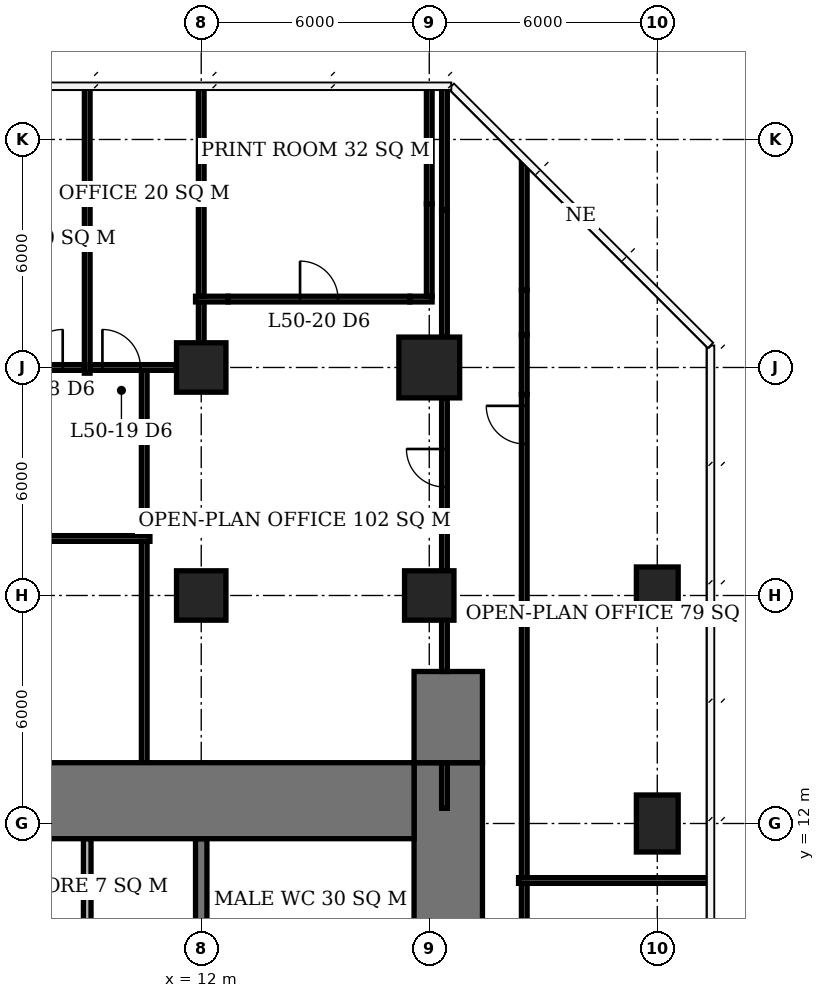
"""IFC4 building model, lengths in metres.
Left out: names, types, materials, properties, quantities, classifications, styles, units other than length and angle.
Written with IfcOpenShell. Run it as: python <this file> out.ifc"""

import sys

from ifc_helpers import new_model, si_unit, direction, frame, frame_2d, origin, origin_2d, place, context, subcontext, project, spatial, rectangle, extrude, element, fill, save


model = new_model("IFC4")
c1 = context("Model", 3, precision=1e-05, world=origin(), true_north=direction((0.0, 1.0)))
c2 = subcontext(c1, "Body", "Model", "MODEL_VIEW")
j1 = project(units=[si_unit("LENGTHUNIT", "METRE"), si_unit("PLANEANGLEUNIT", "RADIAN")], contexts=[c1])
p1 = place(None, origin())
s1 = spatial("IfcSite", under=j1, at=p1, CompositionType="ELEMENT")
p2 = place(p1, origin())
s2 = spatial("IfcBuilding", under=s1, at=p2, CompositionType="ELEMENT")
p3 = place(p2, frame((0.0, 0.0, 204.5)))
s3 = spatial("IfcBuildingStorey", under=s2, at=p3, CompositionType="ELEMENT", Elevation=204.5)
for number, where, z_axis, x_axis in (
    (1, (12.0, 18.0, 0.0), (0.0, 0.0, 1.0), (1.0, 0.0, 0.0)),
    (2, (12.0, 24.0, 0.0), (0.0, 0.0, 1.0), (1.0, 0.0, 0.0)),
    (3, (18.0, 18.0, 0.0), (0.0, 0.0, 1.0), (1.0, 0.0, 0.0)),
):
    element("IfcColumn", number, at=place(p3, frame(where, z_axis=z_axis, x_axis=x_axis)), inside=s3, PredefinedType="COLUMN", context=c2, shape_type="SweptSolid", body=[
        extrude(rectangle(XDim=1.3, YDim=1.3, at=origin_2d()), origin(), (0.0, 0.0, 1.0), 3.9),
    ])
p4 = place(p3, frame((18.0, 24.0, 0.0), z_axis=(0.0, 0.0, 1.0), x_axis=(1.0, 0.0, 0.0)))
e4 = element("IfcColumn", 4, at=p4, inside=s3, PredefinedType="COLUMN", context=c2, shape_type="SweptSolid", body=[
    extrude(rectangle(XDim=1.6, YDim=1.6, at=origin_2d()), origin(), (0.0, 0.0, 1.0), 3.9),
])
for number, where, z_axis, x_axis in (
    (5, (24.0, 12.0, 0.0), (0.0, 0.0, 1.0), (0.0, 1.0, 0.0)),
    (6, (24.0, 18.0, 0.0), (0.0, 0.0, 1.0), (0.0, 1.0, 0.0)),
):
    element("IfcColumn", number, at=place(p3, frame(where, z_axis=z_axis, x_axis=x_axis)), inside=s3, PredefinedType="COLUMN", context=c2, shape_type="SweptSolid", body=[
        extrude(rectangle(XDim=1.5, YDim=1.1, at=origin_2d()), origin(), (0.0, 0.0, 1.0), 3.9),
    ])
p5 = place(p3, frame((-5.6, 12.6, 0.0), z_axis=(0.0, 0.0, 1.0), x_axis=(1.0, 0.0, 0.0)))
e7 = element("IfcWall", 7, at=p5, inside=s3, PredefinedType="SHEAR", context=c2, shape_type="SweptSolid", body=[
    extrude(rectangle(XDim=23.2, YDim=2.0, at=frame_2d((11.6, 0.0))), origin(), (0.0, 0.0, 1.0), 3.9),
])
p6 = place(p3, frame((18.5, -7.6, 0.0), z_axis=(0.0, 0.0, 1.0), x_axis=(0.0, 1.0, 0.0)))
e8 = element("IfcWall", 8, at=p6, inside=s3, PredefinedType="SHEAR", context=c2, shape_type="SweptSolid", body=[
    extrude(rectangle(XDim=21.2, YDim=1.8, at=frame_2d((10.6, 0.0))), origin(), (0.0, 0.0, 1.0), 3.9),
])
p7 = place(p6, frame((9.2, 0.0, 0.0)))
e9 = element("IfcOpeningElement", 9, at=p7, cuts=e8, PredefinedType="OPENING", context=c2, shape_type="SweptSolid", body=[
    extrude(rectangle(XDim=1.8, YDim=2.4, at=frame_2d((0.9, 1.2))), frame((0.0, 0.91, 0.0), z_axis=(0.0, -1.0, 0.0), x_axis=(1.0, 0.0, 0.0)), (0.0, 0.0, 1.0), 1.82),
])
p8 = place(p3, frame((18.5, 13.6, 0.0), z_axis=(0.0, 0.0, 1.0), x_axis=(0.0, 1.0, 0.0)))
e10 = element("IfcWall", 10, at=p8, inside=s3, PredefinedType="SHEAR", context=c2, shape_type="SweptSolid", body=[
    extrude(rectangle(XDim=2.4, YDim=1.8, at=frame_2d((1.2, 0.0))), origin(), (0.0, 0.0, 1.0), 3.9),
])
p9 = place(p3, frame((12.0, 6.15, 0.0), z_axis=(0.0, 0.0, 1.0), x_axis=(0.0, 1.0, 0.0)))
e11 = element("IfcWall", 11, at=p9, inside=s3, PredefinedType="SHEAR", context=c2, shape_type="SweptSolid", body=[
    extrude(rectangle(XDim=5.45, YDim=0.3, at=frame_2d((2.725, 0.0))), origin(), (0.0, 0.0, 1.0), 3.9),
])
p10 = place(p3, frame((9.0, 6.15, 0.0), z_axis=(0.0, 0.0, 1.0), x_axis=(0.0, 1.0, 0.0)))
e12 = element("IfcWall", 12, at=p10, inside=s3, PredefinedType="SOLIDWALL", context=c2, shape_type="SweptSolid", body=[
    extrude(rectangle(XDim=5.45, YDim=0.2, at=frame_2d((2.725, 0.0))), origin(), (0.0, 0.0, 1.0), 3.9),
])
p11 = place(p3, frame((6.66, 24.0, 0.0), z_axis=(0.0, 0.0, 1.0), x_axis=(1.0, 0.0, 0.0)))
e13 = element("IfcWall", 13, at=p11, inside=s3, PredefinedType="PARTITIONING", context=c2, shape_type="SweptSolid", body=[
    extrude(rectangle(XDim=2.265, YDim=0.15, at=frame_2d((1.133, 0.0))), origin(), (0.0, 0.0, 1.0), 3.65),
])
p12 = place(p11, frame((0.695, 0.0, 0.0)))
e14 = element("IfcOpeningElement", 14, at=p12, cuts=e13, PredefinedType="OPENING", context=c2, shape_type="SweptSolid", body=[
    extrude(rectangle(XDim=1.0, YDim=2.1, at=frame_2d((0.5, 1.05))), frame((0.0, 0.085, 0.0), z_axis=(0.0, -1.0, 0.0), x_axis=(1.0, 0.0, 0.0)), (0.0, 0.0, 1.0), 0.17),
])
p13 = place(p3, frame((9.075, 24.0, 0.0), z_axis=(0.0, 0.0, 1.0), x_axis=(1.0, 0.0, 0.0)))
e15 = element("IfcWall", 15, at=p13, inside=s3, PredefinedType="PARTITIONING", context=c2, shape_type="SweptSolid", body=[
    extrude(rectangle(XDim=2.265, YDim=0.15, at=frame_2d((1.133, 0.0))), origin(), (0.0, 0.0, 1.0), 3.65),
])
p14 = place(p13, frame((0.325, 0.0, 0.0)))
e16 = element("IfcOpeningElement", 16, at=p14, cuts=e15, PredefinedType="OPENING", context=c2, shape_type="SweptSolid", body=[
    extrude(rectangle(XDim=1.0, YDim=2.1, at=frame_2d((0.5, 1.05))), frame((0.0, 0.085, 0.0), z_axis=(0.0, -1.0, 0.0), x_axis=(1.0, 0.0, 0.0)), (0.0, 0.0, 1.0), 0.17),
])
p15 = place(p3, frame((11.85, 25.8, 0.0), z_axis=(0.0, 0.0, 1.0), x_axis=(1.0, 0.0, 0.0)))
e17 = element("IfcWall", 17, at=p15, inside=s3, PredefinedType="PARTITIONING", context=c2, shape_type="SweptSolid", body=[
    extrude(rectangle(XDim=0.86, YDim=0.15, at=frame_2d((0.43, 0.0))), origin(), (0.0, 0.0, 1.0), 2.65),
])
p16 = place(p3, frame((12.71, 25.8, 0.0), z_axis=(0.0, 0.0, 1.0), x_axis=(1.0, 0.0, 0.0)))
e18 = element("IfcWall", 18, at=p16, inside=s3, PredefinedType="PARTITIONING", context=c2, shape_type="SweptSolid", body=[
    extrude(rectangle(XDim=4.78, YDim=0.15, at=frame_2d((2.39, 0.0))), origin(), (0.0, 0.0, 1.0), 3.65),
])
p17 = place(p16, frame((1.89, 0.0, 0.0)))
e19 = element("IfcOpeningElement", 19, at=p17, cuts=e18, PredefinedType="OPENING", context=c2, shape_type="SweptSolid", body=[
    extrude(rectangle(XDim=1.0, YDim=2.1, at=frame_2d((0.5, 1.05))), frame((0.0, 0.085, 0.0), z_axis=(0.0, -1.0, 0.0), x_axis=(1.0, 0.0, 0.0)), (0.0, 0.0, 1.0), 0.17),
])
p18 = place(p3, frame((17.49, 25.8, 0.0), z_axis=(0.0, 0.0, 1.0), x_axis=(1.0, 0.0, 0.0)))
e20 = element("IfcWall", 20, at=p18, inside=s3, PredefinedType="PARTITIONING", context=c2, shape_type="SweptSolid", body=[
    extrude(rectangle(XDim=0.585, YDim=0.15, at=frame_2d((0.292, 0.0))), origin(), (0.0, 0.0, 1.0), 2.65),
])
p19 = place(p3, frame((9.0, 23.85, 0.0), z_axis=(0.0, 0.0, 1.0), x_axis=(0.0, 1.0, 0.0)))
e21 = element("IfcWall", 21, at=p19, inside=s3, PredefinedType="PARTITIONING", context=c2, shape_type="SweptSolid", body=[
    extrude(rectangle(XDim=3.74, YDim=0.15, at=frame_2d((1.87, 0.0))), origin(), (0.0, 0.0, 1.0), 3.65),
])
p20 = place(p3, frame((9.0, 27.59, 0.0), z_axis=(0.0, 0.0, 1.0), x_axis=(0.0, 1.0, 0.0)))
e22 = element("IfcWall", 22, at=p20, inside=s3, PredefinedType="PARTITIONING", context=c2, shape_type="SweptSolid", body=[
    extrude(rectangle(XDim=0.72, YDim=0.15, at=frame_2d((0.36, 0.0))), origin(), (0.0, 0.0, 1.0), 2.65),
])
p21 = place(p3, frame((9.0, 28.31, 0.0), z_axis=(0.0, 0.0, 1.0), x_axis=(0.0, 1.0, 0.0)))
e23 = element("IfcWall", 23, at=p21, inside=s3, PredefinedType="PARTITIONING", context=c2, shape_type="SweptSolid", body=[
    extrude(rectangle(XDim=3.09, YDim=0.15, at=frame_2d((1.545, 0.0))), origin(), (0.0, 0.0, 1.0), 3.65),
])
p22 = place(p3, frame((12.0, 24.65, 0.0), z_axis=(0.0, 0.0, 1.0), x_axis=(0.0, 1.0, 0.0)))
e24 = element("IfcWall", 24, at=p22, inside=s3, PredefinedType="PARTITIONING", context=c2, shape_type="SweptSolid", body=[
    extrude(rectangle(XDim=1.075, YDim=0.15, at=frame_2d((0.538, 0.0))), origin(), (0.0, 0.0, 1.0), 2.65),
])
p23 = place(p3, frame((12.0, 25.875, 0.0), z_axis=(0.0, 0.0, 1.0), x_axis=(0.0, 1.0, 0.0)))
e25 = element("IfcWall", 25, at=p23, inside=s3, PredefinedType="PARTITIONING", context=c2, shape_type="SweptSolid", body=[
    extrude(rectangle(XDim=2.435, YDim=0.15, at=frame_2d((1.218, 0.0))), origin(), (0.0, 0.0, 1.0), 2.65),
])
p24 = place(p3, frame((12.0, 28.31, 0.0), z_axis=(0.0, 0.0, 1.0), x_axis=(0.0, 1.0, 0.0)))
e26 = element("IfcWall", 26, at=p24, inside=s3, PredefinedType="PARTITIONING", context=c2, shape_type="SweptSolid", body=[
    extrude(rectangle(XDim=3.09, YDim=0.15, at=frame_2d((1.545, 0.0))), origin(), (0.0, 0.0, 1.0), 3.65),
])
p25 = place(p3, frame((18.0, 25.875, 0.0), z_axis=(0.0, 0.0, 1.0), x_axis=(0.0, 1.0, 0.0)))
e27 = element("IfcWall", 27, at=p25, inside=s3, PredefinedType="PARTITIONING", context=c2, shape_type="SweptSolid", body=[
    extrude(rectangle(XDim=2.435, YDim=0.15, at=frame_2d((1.218, 0.0))), origin(), (0.0, 0.0, 1.0), 2.65),
])
p26 = place(p3, frame((18.0, 28.31, 0.0), z_axis=(0.0, 0.0, 1.0), x_axis=(0.0, 1.0, 0.0)))
e28 = element("IfcWall", 28, at=p26, inside=s3, PredefinedType="PARTITIONING", context=c2, shape_type="SweptSolid", body=[
    extrude(rectangle(XDim=3.09, YDim=0.15, at=frame_2d((1.545, 0.0))), origin(), (0.0, 0.0, 1.0), 3.65),
])
p27 = place(p3, frame((-6.325, 19.5, 0.0), z_axis=(0.0, 0.0, 1.0), x_axis=(1.0, 0.0, 0.0)))
e29 = element("IfcWall", 29, at=p27, inside=s3, PredefinedType="PARTITIONING", context=c2, shape_type="SweptSolid", body=[
    extrude(rectangle(XDim=16.975, YDim=0.15, at=frame_2d((8.487, 0.0))), origin(), (0.0, 0.0, 1.0), 3.65),
])
p28 = place(p3, frame((10.5, 12.4, 0.0), z_axis=(0.0, 0.0, 1.0), x_axis=(0.0, 1.0, 0.0)))
e30 = element("IfcWall", 30, at=p28, inside=s3, PredefinedType="PARTITIONING", context=c2, shape_type="SweptSolid", body=[
    extrude(rectangle(XDim=7.025, YDim=0.15, at=frame_2d((3.513, 0.0))), origin(), (0.0, 0.0, 1.0), 3.65),
])
p29 = place(p3, frame((10.5, 19.575, 0.0), z_axis=(0.0, 0.0, 1.0), x_axis=(0.0, 1.0, 0.0)))
e31 = element("IfcWall", 31, at=p29, inside=s3, PredefinedType="PARTITIONING", context=c2, shape_type="SweptSolid", body=[
    extrude(rectangle(XDim=4.35, YDim=0.15, at=frame_2d((2.175, 0.0))), origin(), (0.0, 0.0, 1.0), 3.65),
])
p30 = place(p3, frame((18.4, 12.4, 0.0), z_axis=(0.0, 0.0, 1.0), x_axis=(0.0, 1.0, 0.0)))
e32 = element("IfcWall", 32, at=p30, inside=s3, PredefinedType="PARTITIONING", context=c2, shape_type="SweptSolid", body=[
    extrude(rectangle(XDim=1.2, YDim=0.15, at=frame_2d((0.6, 0.0))), origin(), (0.0, 0.0, 1.0), 3.65),
])
p31 = place(p3, frame((18.4, 16.0, 0.0), z_axis=(0.0, 0.0, 1.0), x_axis=(0.0, 1.0, 0.0)))
e33 = element("IfcWall", 33, at=p31, inside=s3, PredefinedType="PARTITIONING", context=c2, shape_type="SweptSolid", body=[
    extrude(rectangle(XDim=1.35, YDim=0.15, at=frame_2d((0.675, 0.0))), origin(), (0.0, 0.0, 1.0), 3.65),
])
p32 = place(p3, frame((18.4, 18.65, 0.0), z_axis=(0.0, 0.0, 1.0), x_axis=(0.0, 1.0, 0.0)))
e34 = element("IfcWall", 34, at=p32, inside=s3, PredefinedType="PARTITIONING", context=c2, shape_type="SweptSolid", body=[
    extrude(rectangle(XDim=4.55, YDim=0.15, at=frame_2d((2.275, 0.0))), origin(), (0.0, 0.0, 1.0), 3.65),
])
p33 = place(p32, frame((2.205, 0.0, 0.0)))
e35 = element("IfcOpeningElement", 35, at=p33, cuts=e34, PredefinedType="OPENING", context=c2, shape_type="SweptSolid", body=[
    extrude(rectangle(XDim=1.0, YDim=2.1, at=frame_2d((0.5, 1.05))), frame((0.0, 0.085, 0.0), z_axis=(0.0, -1.0, 0.0), x_axis=(1.0, 0.0, 0.0)), (0.0, 0.0, 1.0), 0.17),
])
p34 = place(p3, frame((18.4, 24.8, 0.0), z_axis=(0.0, 0.0, 1.0), x_axis=(0.0, 1.0, 0.0)))
e36 = element("IfcWall", 36, at=p34, inside=s3, PredefinedType="PARTITIONING", context=c2, shape_type="SweptSolid", body=[
    extrude(rectangle(XDim=3.34, YDim=0.15, at=frame_2d((1.67, 0.0))), origin(), (0.0, 0.0, 1.0), 2.65),
])
p35 = place(p3, frame((18.4, 28.14, 0.0), z_axis=(0.0, 0.0, 1.0), x_axis=(0.0, 1.0, 0.0)))
e37 = element("IfcWall", 37, at=p35, inside=s3, PredefinedType="PARTITIONING", context=c2, shape_type="SweptSolid", body=[
    extrude(rectangle(XDim=3.26, YDim=0.15, at=frame_2d((1.63, 0.0))), origin(), (0.0, 0.0, 1.0), 3.65),
])
p36 = place(p3, frame((20.5, 1.575, 0.0), z_axis=(0.0, 0.0, 1.0), x_axis=(0.0, 1.0, 0.0)))
e38 = element("IfcWall", 38, at=p36, inside=s3, PredefinedType="PARTITIONING", context=c2, shape_type="SweptSolid", body=[
    extrude(rectangle(XDim=8.85, YDim=0.15, at=frame_2d((4.425, 0.0))), origin(), (0.0, 0.0, 1.0), 3.65),
])
p37 = place(p36, frame((5.275, 0.0, 0.0)))
e39 = element("IfcOpeningElement", 39, at=p37, cuts=e38, PredefinedType="OPENING", context=c2, shape_type="SweptSolid", body=[
    extrude(rectangle(XDim=1.0, YDim=2.1, at=frame_2d((0.5, 1.05))), frame((0.0, 0.085, 0.0), z_axis=(0.0, -1.0, 0.0), x_axis=(1.0, 0.0, 0.0)), (0.0, 0.0, 1.0), 0.17),
])
p38 = place(p3, frame((20.5, 10.575, 0.0), z_axis=(0.0, 0.0, 1.0), x_axis=(0.0, 1.0, 0.0)))
e40 = element("IfcWall", 40, at=p38, inside=s3, PredefinedType="PARTITIONING", context=c2, shape_type="SweptSolid", body=[
    extrude(rectangle(XDim=12.715, YDim=0.15, at=frame_2d((6.357, 0.0))), origin(), (0.0, 0.0, 1.0), 3.65),
])
p39 = place(p38, frame((11.415, 0.0, 0.0)))
e41 = element("IfcOpeningElement", 41, at=p39, cuts=e40, PredefinedType="OPENING", context=c2, shape_type="SweptSolid", body=[
    extrude(rectangle(XDim=1.0, YDim=2.1, at=frame_2d((0.5, 1.05))), frame((0.0, 0.085, 0.0), z_axis=(0.0, -1.0, 0.0), x_axis=(1.0, 0.0, 0.0)), (0.0, 0.0, 1.0), 0.17),
])
p40 = place(p3, frame((20.5, 23.29, 0.0), z_axis=(0.0, 0.0, 1.0), x_axis=(0.0, 1.0, 0.0)))
e42 = element("IfcWall", 42, at=p40, inside=s3, PredefinedType="PARTITIONING", context=c2, shape_type="SweptSolid", body=[
    extrude(rectangle(XDim=1.57, YDim=0.15, at=frame_2d((0.785, 0.0))), origin(), (0.0, 0.0, 1.0), 2.65),
])
p41 = place(p3, frame((20.5, 24.86, 0.0), z_axis=(0.0, 0.0, 1.0), x_axis=(0.0, 1.0, 0.0)))
e43 = element("IfcWall", 43, at=p41, inside=s3, PredefinedType="PARTITIONING", context=c2, shape_type="SweptSolid", body=[
    extrude(rectangle(XDim=1.18, YDim=0.15, at=frame_2d((0.59, 0.0))), origin(), (0.0, 0.0, 1.0), 2.65),
])
p42 = place(p3, frame((20.5, 26.04, 0.0), z_axis=(0.0, 0.0, 1.0), x_axis=(0.0, 1.0, 0.0)))
e44 = element("IfcWall", 44, at=p42, inside=s3, PredefinedType="PARTITIONING", context=c2, shape_type="SweptSolid", body=[
    extrude(rectangle(XDim=3.348, YDim=0.15, at=frame_2d((1.674, 0.0))), origin(), (0.0, 0.0, 1.0), 3.65),
])
p43 = place(p3, frame((20.35, 10.5, 0.0), z_axis=(0.0, 0.0, 1.0), x_axis=(1.0, 0.0, 0.0)))
e45 = element("IfcWall", 45, at=p43, inside=s3, PredefinedType="PARTITIONING", context=c2, shape_type="SweptSolid", body=[
    extrude(rectangle(XDim=5.05, YDim=0.15, at=frame_2d((2.525, 0.0))), origin(), (0.0, 0.0, 1.0), 3.65),
])
p44 = place(p12, origin())
e46 = element("IfcDoor", 46, at=p44, inside=s3, OperationType="SINGLE_SWING_RIGHT", PredefinedType="DOOR", context=c2, shape_type="SweptSolid", body=[
    extrude(rectangle(XDim=1.0, YDim=2.1, at=frame_2d((0.5, 1.05))), frame((0.0, 0.025, 0.0), z_axis=(0.0, -1.0, 0.0), x_axis=(1.0, 0.0, 0.0)), (0.0, 0.0, 1.0), 0.05),
])
fill(e14, e46)
p45 = place(p14, origin())
e47 = element("IfcDoor", 47, at=p45, inside=s3, OperationType="SINGLE_SWING_LEFT", PredefinedType="DOOR", context=c2, shape_type="SweptSolid", body=[
    extrude(rectangle(XDim=1.0, YDim=2.1, at=frame_2d((0.5, 1.05))), frame((0.0, 0.025, 0.0), z_axis=(0.0, -1.0, 0.0), x_axis=(1.0, 0.0, 0.0)), (0.0, 0.0, 1.0), 0.05),
])
fill(e16, e47)
p46 = place(p17, origin())
e48 = element("IfcDoor", 48, at=p46, inside=s3, OperationType="SINGLE_SWING_LEFT", PredefinedType="DOOR", context=c2, shape_type="SweptSolid", body=[
    extrude(rectangle(XDim=1.0, YDim=2.1, at=frame_2d((0.5, 1.05))), frame((0.0, 0.025, 0.0), z_axis=(0.0, -1.0, 0.0), x_axis=(1.0, 0.0, 0.0)), (0.0, 0.0, 1.0), 0.05),
])
fill(e19, e48)
p47 = place(p39, origin())
e49 = element("IfcDoor", 49, at=p47, inside=s3, OperationType="SINGLE_SWING_RIGHT", PredefinedType="DOOR", context=c2, shape_type="SweptSolid", body=[
    extrude(rectangle(XDim=1.0, YDim=2.1, at=frame_2d((0.5, 1.05))), frame((0.0, 0.025, 0.0), z_axis=(0.0, -1.0, 0.0), x_axis=(1.0, 0.0, 0.0)), (0.0, 0.0, 1.0), 0.05),
])
fill(e41, e49)
p48 = place(p33, origin())
e50 = element("IfcDoor", 50, at=p48, inside=s3, OperationType="SINGLE_SWING_RIGHT", PredefinedType="DOOR", context=c2, shape_type="SweptSolid", body=[
    extrude(rectangle(XDim=1.0, YDim=2.1, at=frame_2d((0.5, 1.05))), frame((0.0, 0.025, 0.0), z_axis=(0.0, -1.0, 0.0), x_axis=(1.0, 0.0, 0.0)), (0.0, 0.0, 1.0), 0.05),
])
fill(e35, e50)
save(model, sys.argv[1])
